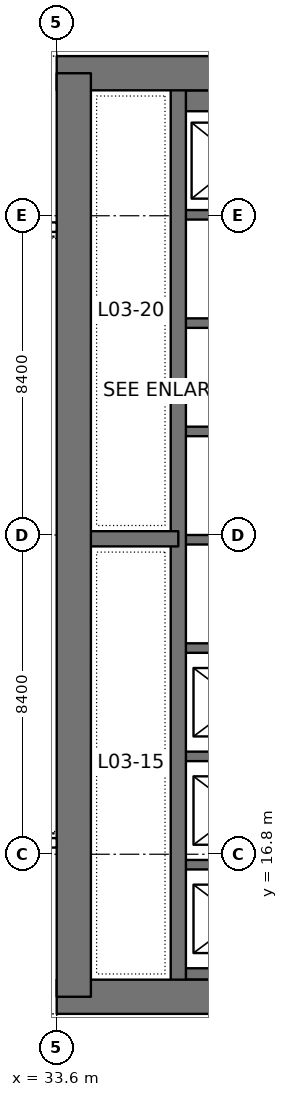
"""IFC4 building model, lengths in metres.
Left out: names, types, materials, properties, quantities, classifications, styles, units other than length and angle.
Written with IfcOpenShell. Run it as: python <this file> out.ifc"""

import sys

from ifc_helpers import new_model, si_unit, direction, frame, frame_2d, origin, place, context, subcontext, project, spatial, rectangle, extrude, element, save


model = new_model("IFC4")
c1 = context("Model", 3, precision=1e-05, world=origin(), true_north=direction((0.0, 1.0)))
c2 = subcontext(c1, "Body", "Model", "MODEL_VIEW")
j1 = project(units=[si_unit("LENGTHUNIT", "METRE"), si_unit("PLANEANGLEUNIT", "RADIAN")], contexts=[c1])
p1 = place(None, origin())
s1 = spatial("IfcSite", under=j1, at=p1, CompositionType="ELEMENT")
p2 = place(p1, origin())
s2 = spatial("IfcBuilding", under=s1, at=p2, CompositionType="ELEMENT")
p3 = place(p2, frame((0.0, 0.0, 14.4)))
s3 = spatial("IfcBuildingStorey", under=s2, at=p3, CompositionType="ELEMENT", Elevation=14.4)
p4 = place(p3, frame((33.6, 13.05, 0.0), z_axis=(0.0, 0.0, 1.0), x_axis=(1.0, 0.0, 0.0)))
e1 = element("IfcWall", 1, at=p4, inside=s3, PredefinedType="SHEAR", context=c2, shape_type="SweptSolid", body=[
    extrude(rectangle(XDim=18.0, YDim=0.9, at=frame_2d((9.0, 0.0))), origin(), (0.0, 0.0, 1.0), 4.5),
])
p5 = place(p4, frame((7.25, 0.0, 0.0)))
e2 = element("IfcOpeningElement", 2, at=p5, cuts=e1, PredefinedType="OPENING", context=c2, shape_type="SweptSolid", body=[
    extrude(rectangle(XDim=1.8, YDim=2.4, at=frame_2d((0.9, 1.2))), frame((0.0, 0.46, 0.0), z_axis=(0.0, -1.0, 0.0), x_axis=(1.0, 0.0, 0.0)), (0.0, 0.0, 1.0), 0.92),
])
p6 = place(p3, frame((33.6, 37.35, 0.0), z_axis=(0.0, 0.0, 1.0), x_axis=(1.0, 0.0, 0.0)))
e3 = element("IfcWall", 3, at=p6, inside=s3, PredefinedType="SHEAR", context=c2, shape_type="SweptSolid", body=[
    extrude(rectangle(XDim=18.0, YDim=0.9, at=frame_2d((9.0, 0.0))), origin(), (0.0, 0.0, 1.0), 4.5),
])
p7 = place(p6, frame((7.25, 0.0, 0.0)))
e4 = element("IfcOpeningElement", 4, at=p7, cuts=e3, PredefinedType="OPENING", context=c2, shape_type="SweptSolid", body=[
    extrude(rectangle(XDim=1.8, YDim=2.4, at=frame_2d((0.9, 1.2))), frame((0.0, 0.46, 0.0), z_axis=(0.0, -1.0, 0.0), x_axis=(1.0, 0.0, 0.0)), (0.0, 0.0, 1.0), 0.92),
])
p8 = place(p3, frame((34.05, 13.05, 0.0), z_axis=(0.0, 0.0, 1.0), x_axis=(0.0, 1.0, 0.0)))
e5 = element("IfcWall", 5, at=p8, inside=s3, PredefinedType="SHEAR", context=c2, shape_type="SweptSolid", body=[
    extrude(rectangle(XDim=24.3, YDim=0.9, at=frame_2d((12.15, 0.0))), origin(), (0.0, 0.0, 1.0), 4.5),
])
p9 = place(p3, frame((36.8, 13.05, 0.0), z_axis=(0.0, 0.0, 1.0), x_axis=(0.0, 1.0, 0.0)))
e6 = element("IfcWall", 6, at=p9, inside=s3, PredefinedType="SHEAR", context=c2, shape_type="SweptSolid", body=[
    extrude(rectangle(XDim=24.3, YDim=0.4, at=frame_2d((12.15, 0.0))), origin(), (0.0, 0.0, 1.0), 4.5),
])
p10 = place(p3, frame((36.8, 25.1, 0.0), z_axis=(0.0, 0.0, 1.0), x_axis=(-1.0, 0.0, 0.0)))
e7 = element("IfcWall", 7, at=p10, inside=s3, PredefinedType="SHEAR", context=c2, shape_type="SweptSolid", body=[
    extrude(rectangle(XDim=2.75, YDim=0.4, at=frame_2d((1.375, 0.0))), origin(), (0.0, 0.0, 1.0), 4.5),
])
p11 = place(p3, frame((40.0, 13.65, 0.0), z_axis=(0.0, 0.0, 1.0), x_axis=(-1.0, 0.0, 0.0)))
e8 = element("IfcWall", 8, at=p11, inside=s3, PredefinedType="SHEAR", context=c2, shape_type="SweptSolid", body=[
    extrude(rectangle(XDim=3.2, YDim=0.3, at=frame_2d((1.6, 0.0))), origin(), (0.0, 0.0, 1.0), 4.5),
])
for number, where, z_axis, x_axis in (
    (9, (40.0, 16.525, 0.0), (0.0, 0.0, 1.0), (-1.0, 0.0, 0.0)),
    (10, (40.0, 19.375, 0.0), (0.0, 0.0, 1.0), (-1.0, 0.0, 0.0)),
    (11, (40.0, 22.225, 0.0), (0.0, 0.0, 1.0), (-1.0, 0.0, 0.0)),
    (12, (40.0, 25.075, 0.0), (0.0, 0.0, 1.0), (-1.0, 0.0, 0.0)),
    (13, (40.0, 27.925, 0.0), (0.0, 0.0, 1.0), (-1.0, 0.0, 0.0)),
    (14, (40.0, 30.775, 0.0), (0.0, 0.0, 1.0), (-1.0, 0.0, 0.0)),
    (15, (40.0, 33.625, 0.0), (0.0, 0.0, 1.0), (-1.0, 0.0, 0.0)),
):
    element("IfcWall", number, at=place(p3, frame(where, z_axis=z_axis, x_axis=x_axis)), inside=s3, PredefinedType="SHEAR", context=c2, shape_type="SweptSolid", body=[
        extrude(rectangle(XDim=3.2, YDim=0.25, at=frame_2d((1.6, 0.0))), origin(), (0.0, 0.0, 1.0), 4.5),
    ])
p12 = place(p3, frame((40.0, 36.625, 0.0), z_axis=(0.0, 0.0, 1.0), x_axis=(-1.0, 0.0, 0.0)))
e16 = element("IfcWall", 16, at=p12, inside=s3, PredefinedType="SHEAR", context=c2, shape_type="SweptSolid", body=[
    extrude(rectangle(XDim=3.2, YDim=0.55, at=frame_2d((1.6, 0.0))), origin(), (0.0, 0.0, 1.0), 4.5),
])
save(model, sys.argv[1])
